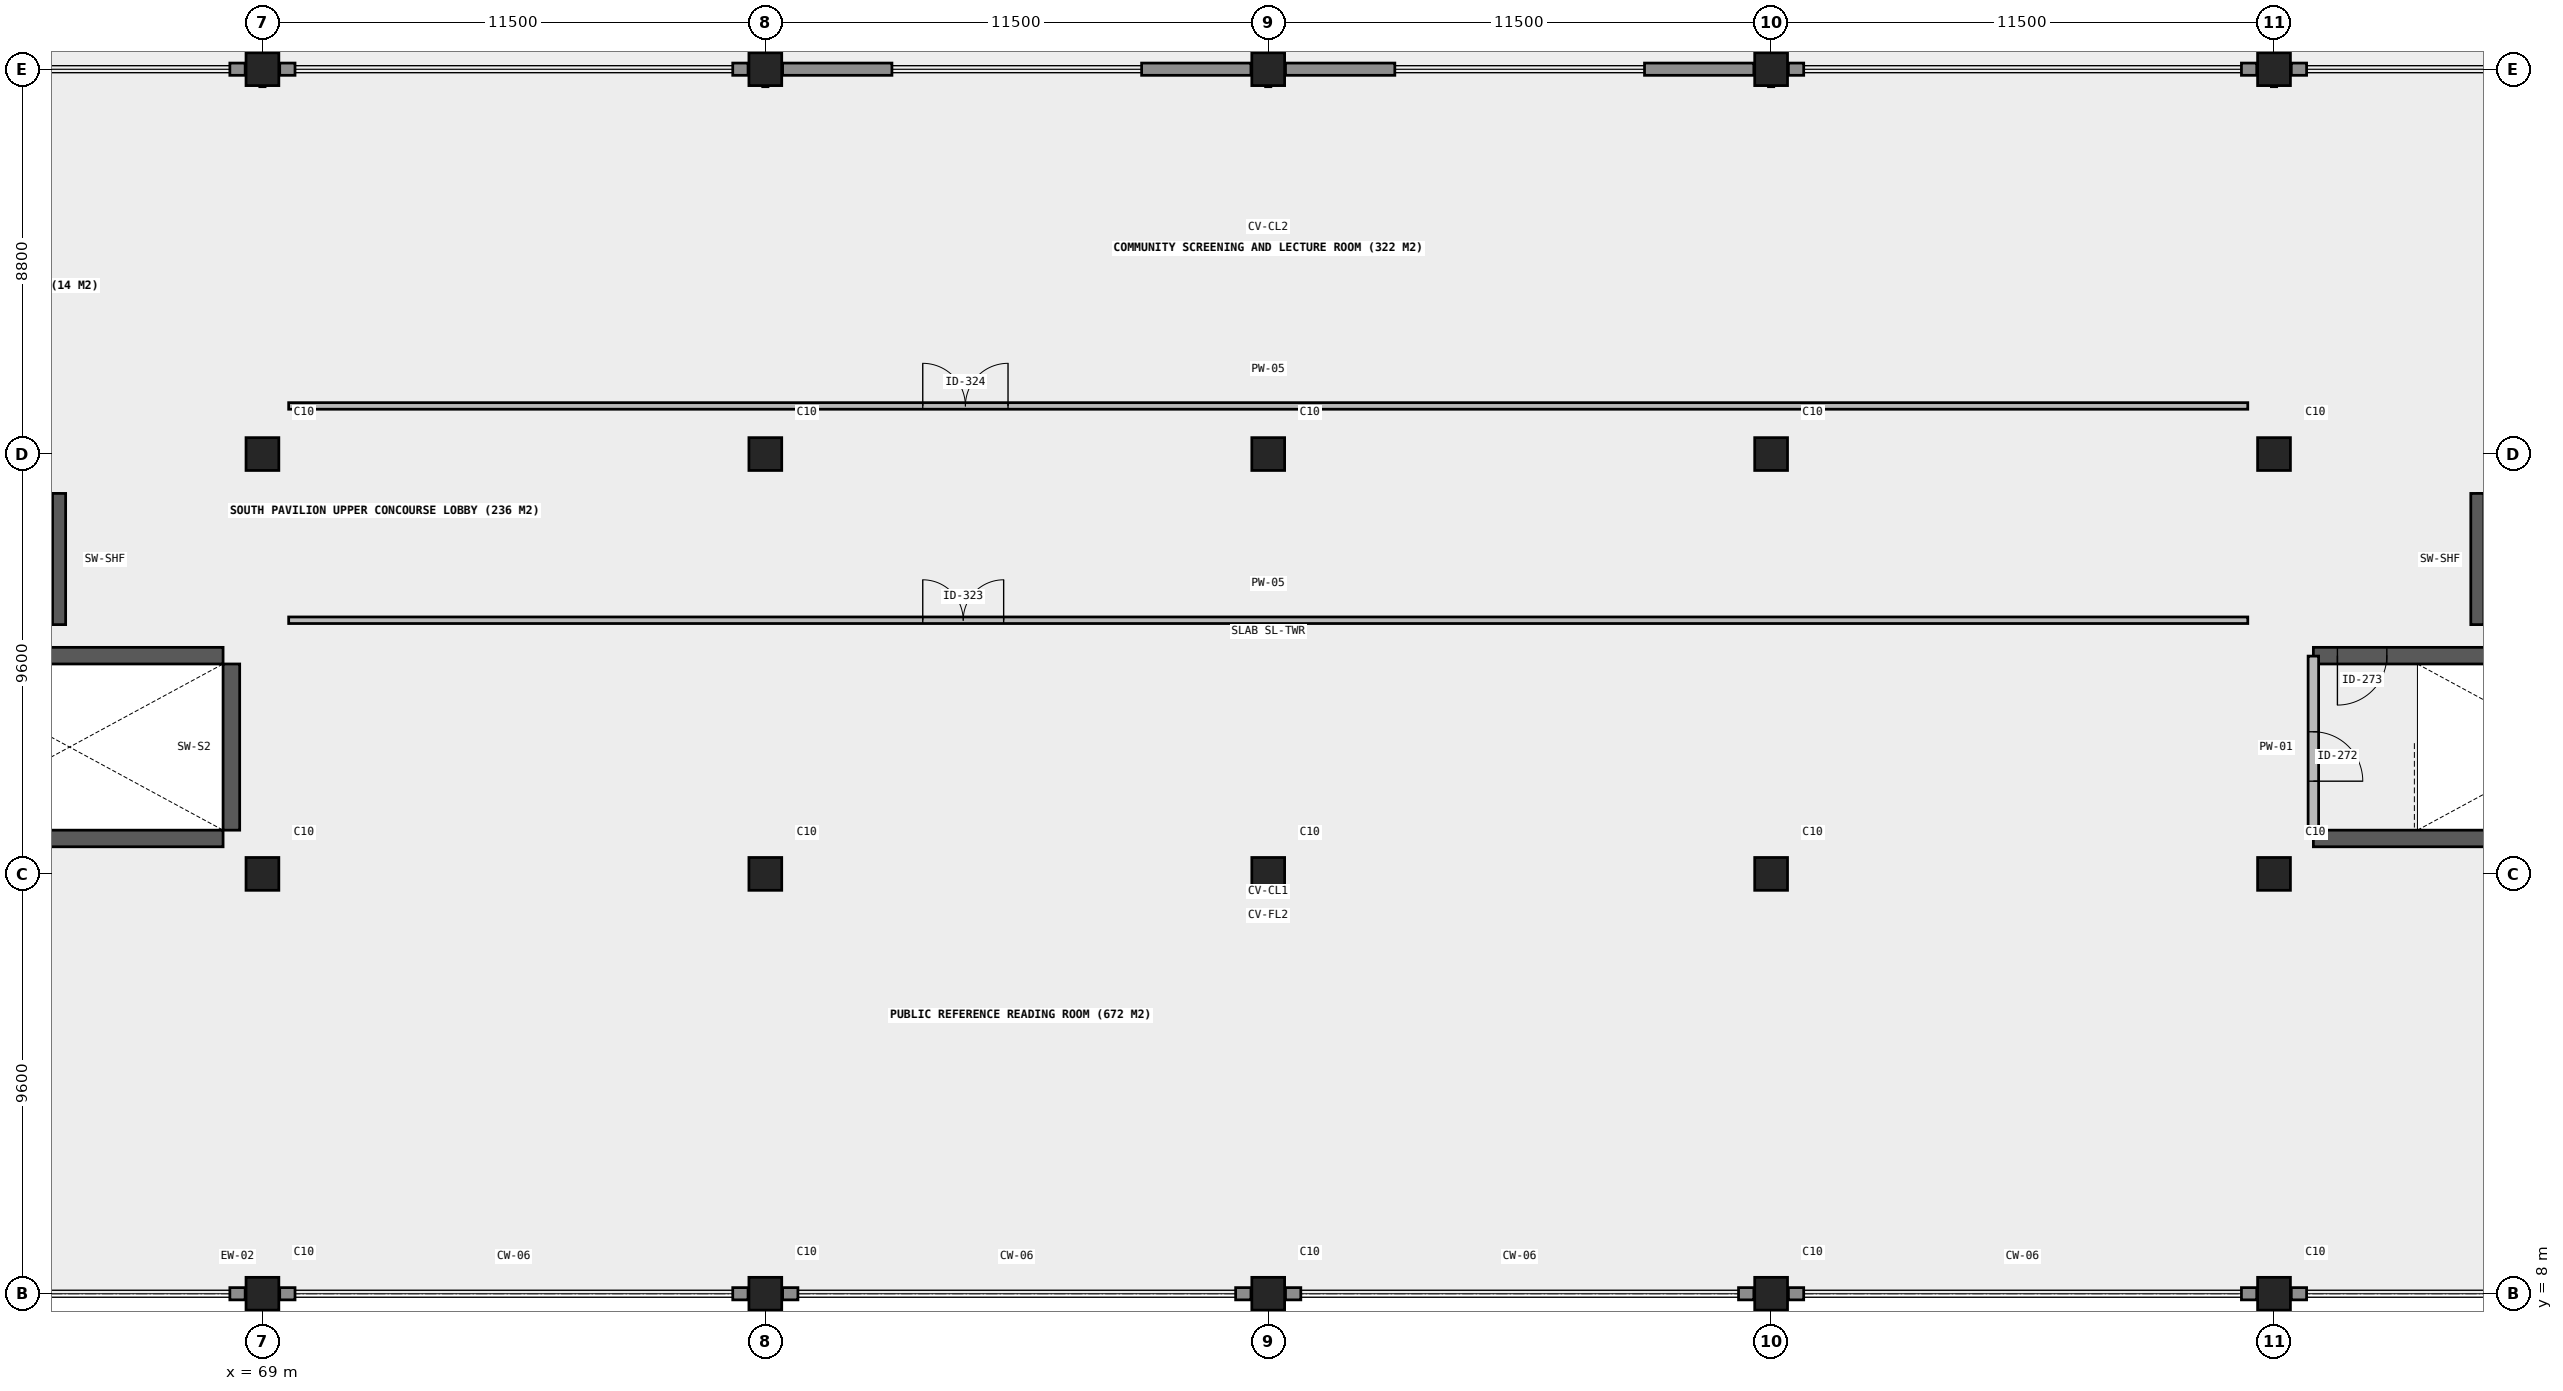
"""IFC4 building model, lengths in metres.
Left out: names, types, materials, properties, quantities, classifications, styles, units other than length and angle.
Written with IfcOpenShell. Run it as: python <this file> out.ifc"""

import sys

from ifc_helpers import new_model, si_unit, direction, frame, frame_2d, origin, origin_2d, place, context, subcontext, project, spatial, rectangle, circle, extrude, element, fill, save


model = new_model("IFC4")
c1 = context("Model", 3, precision=1e-05, world=origin(), true_north=direction((0.0, 1.0)))
c2 = subcontext(c1, "Body", "Model", "MODEL_VIEW")
j1 = project(units=[si_unit("LENGTHUNIT", "METRE"), si_unit("PLANEANGLEUNIT", "RADIAN")], contexts=[c1])
p1 = place(None, origin())
s1 = spatial("IfcSite", under=j1, at=p1, CompositionType="ELEMENT")
p2 = place(p1, origin())
s2 = spatial("IfcBuilding", under=s1, at=p2, CompositionType="ELEMENT")
p3 = place(p2, frame((0.0, 0.0, 13.8)))
s3 = spatial("IfcBuildingStorey", under=s2, at=p3, CompositionType="ELEMENT", Elevation=13.8)
for number, where, z_axis, x_axis in (
    (1, (69.0, 8.0, 0.0), (0.0, 0.0, 1.0), (1.0, 0.0, 0.0)),
    (2, (69.0, 17.6, 0.0), (0.0, 0.0, 1.0), (1.0, 0.0, 0.0)),
    (3, (69.0, 27.2, 0.0), (0.0, 0.0, 1.0), (1.0, 0.0, 0.0)),
):
    element("IfcColumn", number, at=place(p3, frame(where, z_axis=z_axis, x_axis=x_axis)), inside=s3, PredefinedType="COLUMN", context=c2, shape_type="SweptSolid", body=[
        extrude(circle(Radius=0.375, at=origin_2d()), origin(), (0.0, 0.0, 1.0), 4.5),
    ])
p4 = place(p3, frame((69.0, 36.0, 0.0), z_axis=(0.0, 0.0, 1.0), x_axis=(1.0, 0.0, 0.0)))
e4 = element("IfcColumn", 4, at=p4, inside=s3, PredefinedType="COLUMN", context=c2, shape_type="SweptSolid", body=[
    extrude(rectangle(XDim=0.75, YDim=0.75, at=origin_2d()), origin(), (0.0, 0.0, 1.0), 4.5),
])
for number, where, z_axis, x_axis in (
    (5, (80.5, 8.0, 0.0), (0.0, 0.0, 1.0), (1.0, 0.0, 0.0)),
    (6, (80.5, 17.6, 0.0), (0.0, 0.0, 1.0), (1.0, 0.0, 0.0)),
    (7, (80.5, 27.2, 0.0), (0.0, 0.0, 1.0), (1.0, 0.0, 0.0)),
):
    element("IfcColumn", number, at=place(p3, frame(where, z_axis=z_axis, x_axis=x_axis)), inside=s3, PredefinedType="COLUMN", context=c2, shape_type="SweptSolid", body=[
        extrude(circle(Radius=0.375, at=origin_2d()), origin(), (0.0, 0.0, 1.0), 4.5),
    ])
p5 = place(p3, frame((80.5, 36.0, 0.0), z_axis=(0.0, 0.0, 1.0), x_axis=(1.0, 0.0, 0.0)))
e8 = element("IfcColumn", 8, at=p5, inside=s3, PredefinedType="COLUMN", context=c2, shape_type="SweptSolid", body=[
    extrude(rectangle(XDim=0.75, YDim=0.75, at=origin_2d()), origin(), (0.0, 0.0, 1.0), 4.5),
])
for number, where, z_axis, x_axis in (
    (9, (92.0, 8.0, 0.0), (0.0, 0.0, 1.0), (1.0, 0.0, 0.0)),
    (10, (92.0, 17.6, 0.0), (0.0, 0.0, 1.0), (1.0, 0.0, 0.0)),
    (11, (92.0, 27.2, 0.0), (0.0, 0.0, 1.0), (1.0, 0.0, 0.0)),
):
    element("IfcColumn", number, at=place(p3, frame(where, z_axis=z_axis, x_axis=x_axis)), inside=s3, PredefinedType="COLUMN", context=c2, shape_type="SweptSolid", body=[
        extrude(circle(Radius=0.375, at=origin_2d()), origin(), (0.0, 0.0, 1.0), 4.5),
    ])
p6 = place(p3, frame((92.0, 36.0, 0.0), z_axis=(0.0, 0.0, 1.0), x_axis=(1.0, 0.0, 0.0)))
e12 = element("IfcColumn", 12, at=p6, inside=s3, PredefinedType="COLUMN", context=c2, shape_type="SweptSolid", body=[
    extrude(rectangle(XDim=0.75, YDim=0.75, at=origin_2d()), origin(), (0.0, 0.0, 1.0), 4.5),
])
for number, where, z_axis, x_axis in (
    (13, (103.5, 8.0, 0.0), (0.0, 0.0, 1.0), (1.0, 0.0, 0.0)),
    (14, (103.5, 17.6, 0.0), (0.0, 0.0, 1.0), (1.0, 0.0, 0.0)),
    (15, (103.5, 27.2, 0.0), (0.0, 0.0, 1.0), (1.0, 0.0, 0.0)),
):
    element("IfcColumn", number, at=place(p3, frame(where, z_axis=z_axis, x_axis=x_axis)), inside=s3, PredefinedType="COLUMN", context=c2, shape_type="SweptSolid", body=[
        extrude(circle(Radius=0.375, at=origin_2d()), origin(), (0.0, 0.0, 1.0), 4.5),
    ])
p7 = place(p3, frame((103.5, 36.0, 0.0), z_axis=(0.0, 0.0, 1.0), x_axis=(1.0, 0.0, 0.0)))
e16 = element("IfcColumn", 16, at=p7, inside=s3, PredefinedType="COLUMN", context=c2, shape_type="SweptSolid", body=[
    extrude(rectangle(XDim=0.75, YDim=0.75, at=origin_2d()), origin(), (0.0, 0.0, 1.0), 4.5),
])
for number, where, z_axis, x_axis in (
    (17, (115.0, 8.0, 0.0), (0.0, 0.0, 1.0), (1.0, 0.0, 0.0)),
    (18, (115.0, 17.6, 0.0), (0.0, 0.0, 1.0), (1.0, 0.0, 0.0)),
    (19, (115.0, 27.2, 0.0), (0.0, 0.0, 1.0), (1.0, 0.0, 0.0)),
):
    element("IfcColumn", number, at=place(p3, frame(where, z_axis=z_axis, x_axis=x_axis)), inside=s3, PredefinedType="COLUMN", context=c2, shape_type="SweptSolid", body=[
        extrude(circle(Radius=0.375, at=origin_2d()), origin(), (0.0, 0.0, 1.0), 4.5),
    ])
p8 = place(p3, frame((115.0, 36.0, 0.0), z_axis=(0.0, 0.0, 1.0), x_axis=(1.0, 0.0, 0.0)))
e20 = element("IfcColumn", 20, at=p8, inside=s3, PredefinedType="COLUMN", context=c2, shape_type="SweptSolid", body=[
    extrude(rectangle(XDim=0.75, YDim=0.75, at=origin_2d()), origin(), (0.0, 0.0, 1.0), 4.5),
])
p9 = place(p3, frame((62.45, 23.45, 0.0), z_axis=(0.0, 0.0, 1.0), x_axis=(1.0, 0.0, 0.0)))
e21 = element("IfcWall", 21, at=p9, inside=s3, PredefinedType="SHEAR", context=c2, shape_type="SweptSolid", body=[
    extrude(rectangle(XDim=1.9, YDim=0.3, at=frame_2d((0.95, 0.0))), origin(), (0.0, 0.0, 1.0), 4.3),
])
p10 = place(p3, frame((62.45, 26.15, 0.0), z_axis=(0.0, 0.0, 1.0), x_axis=(1.0, 0.0, 0.0)))
e22 = element("IfcWall", 22, at=p10, inside=s3, PredefinedType="SHEAR", context=c2, shape_type="SweptSolid", body=[
    extrude(rectangle(XDim=1.9, YDim=0.3, at=frame_2d((0.95, 0.0))), origin(), (0.0, 0.0, 1.0), 4.3),
])
p11 = place(p10, frame((0.4, 0.0, 0.0)))
e23 = element("IfcOpeningElement", 23, at=p11, cuts=e22, PredefinedType="OPENING", context=c2, shape_type="SweptSolid", body=[
    extrude(rectangle(XDim=1.1, YDim=2.15, at=frame_2d((0.55, 1.075))), frame((0.0, 0.16, 0.0), z_axis=(0.0, -1.0, 0.0), x_axis=(1.0, 0.0, 0.0)), (0.0, 0.0, 1.0), 0.32),
])
p12 = place(p3, frame((64.35, 23.3, 0.0), z_axis=(0.0, 0.0, 1.0), x_axis=(0.0, 1.0, 0.0)))
e24 = element("IfcWall", 24, at=p12, inside=s3, PredefinedType="SHEAR", context=c2, shape_type="SweptSolid", body=[
    extrude(rectangle(XDim=3.0, YDim=0.3, at=frame_2d((1.5, 0.0))), origin(), (0.0, 0.0, 1.0), 4.3),
])
p13 = place(p3, frame((119.65, 23.45, 0.0), z_axis=(0.0, 0.0, 1.0), x_axis=(1.0, 0.0, 0.0)))
e25 = element("IfcWall", 25, at=p13, inside=s3, PredefinedType="SHEAR", context=c2, shape_type="SweptSolid", body=[
    extrude(rectangle(XDim=1.9, YDim=0.3, at=frame_2d((0.95, 0.0))), origin(), (0.0, 0.0, 1.0), 4.3),
])
p14 = place(p3, frame((119.65, 26.15, 0.0), z_axis=(0.0, 0.0, 1.0), x_axis=(1.0, 0.0, 0.0)))
e26 = element("IfcWall", 26, at=p14, inside=s3, PredefinedType="SHEAR", context=c2, shape_type="SweptSolid", body=[
    extrude(rectangle(XDim=1.9, YDim=0.3, at=frame_2d((0.95, 0.0))), origin(), (0.0, 0.0, 1.0), 4.3),
])
p15 = place(p14, frame((0.4, 0.0, 0.0)))
e27 = element("IfcOpeningElement", 27, at=p15, cuts=e26, PredefinedType="OPENING", context=c2, shape_type="SweptSolid", body=[
    extrude(rectangle(XDim=1.1, YDim=2.15, at=frame_2d((0.55, 1.075))), frame((0.0, 0.16, 0.0), z_axis=(0.0, -1.0, 0.0), x_axis=(1.0, 0.0, 0.0)), (0.0, 0.0, 1.0), 0.32),
])
p16 = place(p3, frame((119.65, 23.3, 0.0), z_axis=(0.0, 0.0, 1.0), x_axis=(0.0, 1.0, 0.0)))
e28 = element("IfcWall", 28, at=p16, inside=s3, PredefinedType="SHEAR", context=c2, shape_type="SweptSolid", body=[
    extrude(rectangle(XDim=3.0, YDim=0.3, at=frame_2d((1.5, 0.0))), origin(), (0.0, 0.0, 1.0), 4.3),
])
p17 = place(p3, frame((58.7, 18.41, 0.0), z_axis=(0.0, 0.0, 1.0), x_axis=(1.0, 0.0, 0.0)))
e29 = element("IfcWall", 29, at=p17, inside=s3, PredefinedType="SHEAR", context=c2, shape_type="SweptSolid", body=[
    extrude(rectangle(XDim=9.4, YDim=0.38, at=frame_2d((4.7, 0.0))), origin(), (0.0, 0.0, 1.0), 4.5),
])
p18 = place(p3, frame((58.7, 22.59, 0.0), z_axis=(0.0, 0.0, 1.0), x_axis=(1.0, 0.0, 0.0)))
e30 = element("IfcWall", 30, at=p18, inside=s3, PredefinedType="SHEAR", context=c2, shape_type="SweptSolid", body=[
    extrude(rectangle(XDim=9.4, YDim=0.38, at=frame_2d((4.7, 0.0))), origin(), (0.0, 0.0, 1.0), 4.5),
])
p19 = place(p18, frame((0.55, 0.0, 0.0)))
e31 = element("IfcOpeningElement", 31, at=p19, cuts=e30, PredefinedType="OPENING", context=c2, shape_type="SweptSolid", body=[
    extrude(rectangle(XDim=1.13, YDim=2.15, at=frame_2d((0.565, 1.075))), frame((0.0, 0.2, 0.0), z_axis=(0.0, -1.0, 0.0), x_axis=(1.0, 0.0, 0.0)), (0.0, 0.0, 1.0), 0.4),
])
p20 = place(p3, frame((68.29, 18.6, 0.0), z_axis=(0.0, 0.0, 1.0), x_axis=(0.0, 1.0, 0.0)))
e32 = element("IfcWall", 32, at=p20, inside=s3, PredefinedType="SHEAR", context=c2, shape_type="SweptSolid", body=[
    extrude(rectangle(XDim=3.8, YDim=0.38, at=frame_2d((1.9, 0.0))), origin(), (0.0, 0.0, 1.0), 4.5),
])
p21 = place(p3, frame((115.9, 18.41, 0.0), z_axis=(0.0, 0.0, 1.0), x_axis=(1.0, 0.0, 0.0)))
e33 = element("IfcWall", 33, at=p21, inside=s3, PredefinedType="SHEAR", context=c2, shape_type="SweptSolid", body=[
    extrude(rectangle(XDim=9.4, YDim=0.38, at=frame_2d((4.7, 0.0))), origin(), (0.0, 0.0, 1.0), 4.5),
])
p22 = place(p3, frame((115.9, 22.59, 0.0), z_axis=(0.0, 0.0, 1.0), x_axis=(1.0, 0.0, 0.0)))
e34 = element("IfcWall", 34, at=p22, inside=s3, PredefinedType="SHEAR", context=c2, shape_type="SweptSolid", body=[
    extrude(rectangle(XDim=9.4, YDim=0.38, at=frame_2d((4.7, 0.0))), origin(), (0.0, 0.0, 1.0), 4.5),
])
p23 = place(p22, frame((0.55, 0.0, 0.0)))
e35 = element("IfcOpeningElement", 35, at=p23, cuts=e34, PredefinedType="OPENING", context=c2, shape_type="SweptSolid", body=[
    extrude(rectangle(XDim=1.13, YDim=2.15, at=frame_2d((0.565, 1.075))), frame((0.0, 0.2, 0.0), z_axis=(0.0, -1.0, 0.0), x_axis=(1.0, 0.0, 0.0)), (0.0, 0.0, 1.0), 0.4),
])
for number, where, z_axis, x_axis in (
    (36, (68.255, 8.0, 0.0), (0.0, 0.0, 1.0), (1.0, 0.0, 0.0)),
    (37, (69.395, 8.0, 0.0), (0.0, 0.0, 1.0), (1.0, 0.0, 0.0)),
    (38, (79.755, 8.0, 0.0), (0.0, 0.0, 1.0), (1.0, 0.0, 0.0)),
    (39, (80.895, 8.0, 0.0), (0.0, 0.0, 1.0), (1.0, 0.0, 0.0)),
    (40, (91.255, 8.0, 0.0), (0.0, 0.0, 1.0), (1.0, 0.0, 0.0)),
    (41, (92.395, 8.0, 0.0), (0.0, 0.0, 1.0), (1.0, 0.0, 0.0)),
    (42, (102.755, 8.0, 0.0), (0.0, 0.0, 1.0), (1.0, 0.0, 0.0)),
    (43, (103.895, 8.0, 0.0), (0.0, 0.0, 1.0), (1.0, 0.0, 0.0)),
    (44, (114.255, 8.0, 0.0), (0.0, 0.0, 1.0), (1.0, 0.0, 0.0)),
    (45, (115.395, 8.0, 0.0), (0.0, 0.0, 1.0), (1.0, 0.0, 0.0)),
    (46, (68.255, 36.0, 0.0), (0.0, 0.0, 1.0), (1.0, 0.0, 0.0)),
    (47, (69.395, 36.0, 0.0), (0.0, 0.0, 1.0), (1.0, 0.0, 0.0)),
    (48, (79.755, 36.0, 0.0), (0.0, 0.0, 1.0), (1.0, 0.0, 0.0)),
):
    element("IfcWall", number, at=place(p3, frame(where, z_axis=z_axis, x_axis=x_axis)), inside=s3, PredefinedType="SOLIDWALL", context=c2, shape_type="SweptSolid", body=[
        extrude(rectangle(XDim=0.35, YDim=0.28, at=frame_2d((0.175, 0.0))), origin(), (0.0, 0.0, 1.0), 4.24),
    ])
for number, where, z_axis, x_axis in (
    (49, (80.895, 36.0, 0.0), (0.0, 0.0, 1.0), (1.0, 0.0, 0.0)),
    (50, (89.105, 36.0, 0.0), (0.0, 0.0, 1.0), (1.0, 0.0, 0.0)),
    (51, (92.395, 36.0, 0.0), (0.0, 0.0, 1.0), (1.0, 0.0, 0.0)),
    (52, (100.605, 36.0, 0.0), (0.0, 0.0, 1.0), (1.0, 0.0, 0.0)),
):
    element("IfcWall", number, at=place(p3, frame(where, z_axis=z_axis, x_axis=x_axis)), inside=s3, PredefinedType="SOLIDWALL", context=c2, shape_type="SweptSolid", body=[
        extrude(rectangle(XDim=2.5, YDim=0.28, at=frame_2d((1.25, 0.0))), origin(), (0.0, 0.0, 1.0), 3.35),
    ])
for number, where, z_axis, x_axis in (
    (53, (103.895, 36.0, 0.0), (0.0, 0.0, 1.0), (1.0, 0.0, 0.0)),
    (54, (114.255, 36.0, 0.0), (0.0, 0.0, 1.0), (1.0, 0.0, 0.0)),
    (55, (115.395, 36.0, 0.0), (0.0, 0.0, 1.0), (1.0, 0.0, 0.0)),
):
    element("IfcWall", number, at=place(p3, frame(where, z_axis=z_axis, x_axis=x_axis)), inside=s3, PredefinedType="SOLIDWALL", context=c2, shape_type="SweptSolid", body=[
        extrude(rectangle(XDim=0.35, YDim=0.28, at=frame_2d((0.175, 0.0))), origin(), (0.0, 0.0, 1.0), 4.24),
    ])
p24 = place(p3, frame((115.9, 18.42, 0.0), z_axis=(0.0, 0.0, 1.0), x_axis=(0.0, 1.0, 0.0)))
e56 = element("IfcWall", 56, at=p24, inside=s3, PredefinedType="SOLIDWALL", context=c2, shape_type="SweptSolid", body=[
    extrude(rectangle(XDim=4.16, YDim=0.24, at=frame_2d((2.08, 0.0))), origin(), (0.0, 0.0, 1.0), 4.22),
])
p25 = place(p24, frame((1.3, 0.0, 0.0)))
e57 = element("IfcOpeningElement", 57, at=p25, cuts=e56, PredefinedType="OPENING", context=c2, shape_type="SweptSolid", body=[
    extrude(rectangle(XDim=1.13, YDim=2.15, at=frame_2d((0.565, 1.075))), frame((0.0, 0.13, 0.0), z_axis=(0.0, -1.0, 0.0), x_axis=(1.0, 0.0, 0.0)), (0.0, 0.0, 1.0), 0.26),
])
p26 = place(p3, frame((69.6, 23.4, 0.0), z_axis=(0.0, 0.0, 1.0), x_axis=(1.0, 0.0, 0.0)))
e58 = element("IfcWall", 58, at=p26, inside=s3, PredefinedType="PARTITIONING", context=c2, shape_type="SweptSolid", body=[
    extrude(rectangle(XDim=44.8, YDim=0.15, at=frame_2d((22.4, 0.0))), origin(), (0.0, 0.0, 1.0), 4.22),
])
p27 = place(p26, frame((14.5, 0.0, 0.0)))
e59 = element("IfcOpeningElement", 59, at=p27, cuts=e58, PredefinedType="OPENING", context=c2, shape_type="SweptSolid", body=[
    extrude(rectangle(XDim=1.85, YDim=2.25, at=frame_2d((0.925, 1.125))), frame((0.0, 0.085, 0.0), z_axis=(0.0, -1.0, 0.0), x_axis=(1.0, 0.0, 0.0)), (0.0, 0.0, 1.0), 0.17),
])
p28 = place(p3, frame((69.6, 28.3, 0.0), z_axis=(0.0, 0.0, 1.0), x_axis=(1.0, 0.0, 0.0)))
e60 = element("IfcWall", 60, at=p28, inside=s3, PredefinedType="PARTITIONING", context=c2, shape_type="SweptSolid", body=[
    extrude(rectangle(XDim=44.8, YDim=0.15, at=frame_2d((22.4, 0.0))), origin(), (0.0, 0.0, 1.0), 4.22),
])
p29 = place(p28, frame((14.5, 0.0, 0.0)))
e61 = element("IfcOpeningElement", 61, at=p29, cuts=e60, PredefinedType="OPENING", context=c2, shape_type="SweptSolid", body=[
    extrude(rectangle(XDim=1.95, YDim=2.25, at=frame_2d((0.975, 1.125))), frame((0.0, 0.085, 0.0), z_axis=(0.0, -1.0, 0.0), x_axis=(1.0, 0.0, 0.0)), (0.0, 0.0, 1.0), 0.17),
])
p30 = place(p25, frame((0.565, 0.0, 0.0), z_axis=(0.0, 0.0, 1.0), x_axis=(-1.0, 0.0, 0.0)))
e62 = element("IfcDoor", 62, at=p30, inside=s3, OperationType="SINGLE_SWING_LEFT", PredefinedType="DOOR", context=c2, shape_type="SweptSolid", body=[
    extrude(rectangle(XDim=1.13, YDim=2.15, at=frame_2d((0.0, 1.075))), frame((0.0, 0.025, 0.0), z_axis=(0.0, -1.0, 0.0), x_axis=(1.0, 0.0, 0.0)), (0.0, 0.0, 1.0), 0.05),
])
fill(e57, e62)
p31 = place(p23, frame((0.565, 0.0, 0.0), z_axis=(0.0, 0.0, 1.0), x_axis=(-1.0, 0.0, 0.0)))
e63 = element("IfcDoor", 63, at=p31, inside=s3, OperationType="SINGLE_SWING_LEFT", PredefinedType="DOOR", context=c2, shape_type="SweptSolid", body=[
    extrude(rectangle(XDim=1.13, YDim=2.15, at=frame_2d((0.0, 1.075))), frame((0.0, 0.025, 0.0), z_axis=(0.0, -1.0, 0.0), x_axis=(1.0, 0.0, 0.0)), (0.0, 0.0, 1.0), 0.05),
])
fill(e35, e63)
p32 = place(p27, origin())
e64 = element("IfcDoor", 64, at=p32, inside=s3, OperationType="DOUBLE_DOOR_SINGLE_SWING", PredefinedType="DOOR", context=c2, shape_type="SweptSolid", body=[
    extrude(rectangle(XDim=1.85, YDim=2.25, at=frame_2d((0.925, 1.125))), frame((0.0, 0.025, 0.0), z_axis=(0.0, -1.0, 0.0), x_axis=(1.0, 0.0, 0.0)), (0.0, 0.0, 1.0), 0.05),
])
fill(e59, e64)
p33 = place(p29, origin())
e65 = element("IfcDoor", 65, at=p33, inside=s3, OperationType="DOUBLE_DOOR_SINGLE_SWING", PredefinedType="DOOR", context=c2, shape_type="SweptSolid", body=[
    extrude(rectangle(XDim=1.95, YDim=2.25, at=frame_2d((0.975, 1.125))), frame((0.0, 0.025, 0.0), z_axis=(0.0, -1.0, 0.0), x_axis=(1.0, 0.0, 0.0)), (0.0, 0.0, 1.0), 0.05),
])
fill(e61, e65)
save(model, sys.argv[1])
